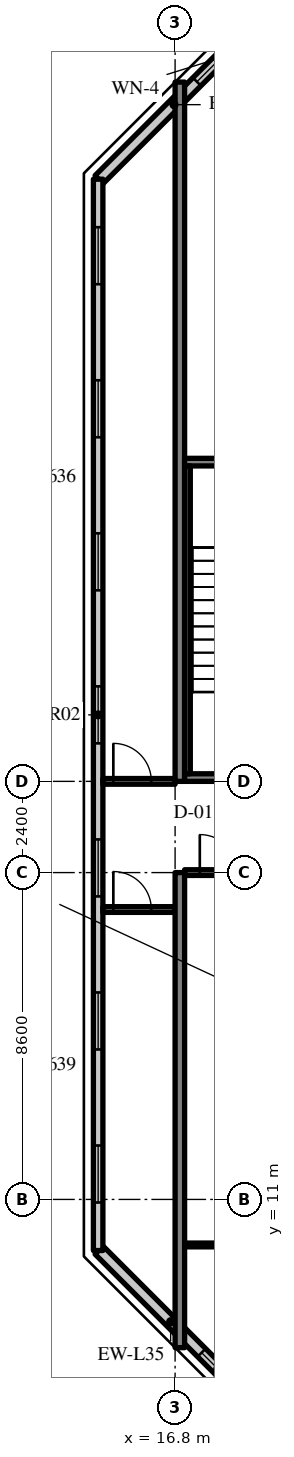
"""IFC4 building model, lengths in metres.
Left out: names, types, materials, properties, quantities, classifications, styles, units other than length and angle.
Written with IfcOpenShell. Run it as: python <this file> out.ifc"""

import sys

from ifc_helpers import new_model, si_unit, direction, frame, frame_2d, origin, place, context, subcontext, project, spatial, rectangle, extrude, source, transform, mapped, element, fill, save


model = new_model("IFC4")
c1 = context("Model", 3, precision=1e-05, world=origin(), true_north=direction((0.0, 1.0)))
c2 = subcontext(c1, "Body", "Model", "MODEL_VIEW")
j1 = project(units=[si_unit("LENGTHUNIT", "METRE"), si_unit("PLANEANGLEUNIT", "RADIAN")], contexts=[c1])
p1 = place(None, origin())
s1 = spatial("IfcSite", under=j1, at=p1, CompositionType="ELEMENT")
p2 = place(p1, origin())
s2 = spatial("IfcBuilding", under=s1, at=p2, CompositionType="ELEMENT")
p3 = place(p2, frame((0.0, 0.0, 277.7)))
s3 = spatial("IfcBuildingStorey", under=s2, at=p3, CompositionType="ELEMENT", Elevation=277.7)
m1 = source(origin(), c2, "Body", "SweptSolid", [
    extrude(rectangle(XDim=12.5, YDim=0.25, at=frame_2d((6.25, 0.0))), origin(), (0.0, 0.0, 1.0), 3.72),
])
p4 = place(p3, frame((16.925, 7.1, 0.0), z_axis=(0.0, 0.0, 1.0), x_axis=(0.0, 1.0, 0.0)))
e1 = element("IfcWall", 1, at=p4, inside=s3, PredefinedType="SHEAR", context=c2, shape_type="MappedRepresentation", body=[
    mapped(m1, transform((0.0, 0.0, 0.0), scale=1.0)),
])
m2 = source(origin(), c2, "Body", "SweptSolid", [
    extrude(rectangle(XDim=18.4, YDim=0.25, at=frame_2d((9.2, 0.0))), origin(), (0.0, 0.0, 1.0), 3.72),
])
p5 = place(p3, frame((16.925, 22.0, 0.0), z_axis=(0.0, 0.0, 1.0), x_axis=(0.0, 1.0, 0.0)))
e2 = element("IfcWall", 2, at=p5, inside=s3, PredefinedType="SHEAR", context=c2, shape_type="MappedRepresentation", body=[
    mapped(m2, transform((0.0, 0.0, 0.0), scale=1.0)),
])
m3 = source(origin(), c2, "Body", "SweptSolid", [
    extrude(rectangle(XDim=5.576, YDim=0.3, at=frame_2d((2.788, 0.0))), origin(), (0.0, 0.0, 1.0), 3.72),
])
p6 = place(p3, frame((18.743, 41.777, 0.0), z_axis=(0.0, 0.0, 1.0), x_axis=(-0.707106781187, -0.707106781187, 0.0)))
e3 = element("IfcWall", 3, at=p6, inside=s3, PredefinedType="SOLIDWALL", context=c2, shape_type="MappedRepresentation", body=[
    mapped(m3, transform((0.0, 0.0, 0.0), scale=1.0)),
])
m4 = source(origin(), c2, "Body", "SweptSolid", [
    extrude(rectangle(XDim=1.8, YDim=1.5, at=frame_2d((0.9, 0.75))), frame((0.0, 0.16, 0.0), z_axis=(0.0, -1.0, 0.0), x_axis=(1.0, 0.0, 0.0)), (0.0, 0.0, 1.0), 0.32),
])
p7 = place(p6, frame((0.135, 0.0, 0.9)))
e4 = element("IfcOpeningElement", 4, at=p7, cuts=e3, PredefinedType="OPENING", context=c2, shape_type="MappedRepresentation", body=[
    mapped(m4, transform((0.0, 0.0, 0.0), scale=1.0)),
])
m5 = source(origin(), c2, "Body", "SweptSolid", [
    extrude(rectangle(XDim=5.326, YDim=0.3, at=frame_2d((2.663, 0.0))), origin(), (0.0, 0.0, 1.0), 3.72),
])
p8 = place(p3, frame((14.8, 9.666, 0.0), z_axis=(0.0, 0.0, 1.0), x_axis=(0.707083859269, -0.707129702361, 0.0)))
e5 = element("IfcWall", 5, at=p8, inside=s3, PredefinedType="SOLIDWALL", context=c2, shape_type="MappedRepresentation", body=[
    mapped(m5, transform((0.0, 0.0, 0.0), scale=1.0)),
])
m6 = source(origin(), c2, "Body", "SweptSolid", [
    extrude(rectangle(XDim=1.2, YDim=1.5, at=frame_2d((0.6, 0.75))), frame((0.0, 0.16, 0.0), z_axis=(0.0, -1.0, 0.0), x_axis=(1.0, 0.0, 0.0)), (0.0, 0.0, 1.0), 0.32),
])
p9 = place(p8, frame((3.815, 0.0, 0.9)))
e6 = element("IfcOpeningElement", 6, at=p9, cuts=e5, PredefinedType="OPENING", context=c2, shape_type="MappedRepresentation", body=[
    mapped(m6, transform((0.0, 0.0, 0.0), scale=1.0)),
])
m7 = source(origin(), c2, "Body", "SweptSolid", [
    extrude(rectangle(XDim=28.189, YDim=0.25, at=frame_2d((14.095, 0.0))), origin(), (0.0, 0.0, 1.0), 3.72),
])
p10 = place(p3, frame((14.775, 37.845, 0.0), z_axis=(0.0, 0.0, 1.0), x_axis=(0.0, -1.0, 0.0)))
e7 = element("IfcWall", 7, at=p10, inside=s3, PredefinedType="SOLIDWALL", context=c2, shape_type="MappedRepresentation", body=[
    mapped(m7, transform((0.0, 0.0, 0.0), scale=1.0)),
])
m8 = source(origin(), c2, "Body", "SweptSolid", [
    extrude(rectangle(XDim=1.5, YDim=1.5, at=frame_2d((0.75, 0.75))), frame((0.0, 0.135, 0.0), z_axis=(0.0, -1.0, 0.0), x_axis=(1.0, 0.0, 0.0)), (0.0, 0.0, 1.0), 0.27),
])
p11 = place(p10, frame((1.263, 0.0, 0.9)))
e8 = element("IfcOpeningElement", 8, at=p11, cuts=e7, PredefinedType="OPENING", context=c2, shape_type="MappedRepresentation", body=[
    mapped(m8, transform((0.0, 0.0, 0.0), scale=1.0)),
])
p12 = place(p10, frame((5.291, 0.0, 0.9)))
e9 = element("IfcOpeningElement", 9, at=p12, cuts=e7, PredefinedType="OPENING", context=c2, shape_type="MappedRepresentation", body=[
    mapped(m8, transform((0.0, 0.0, 0.0), scale=1.0)),
])
p13 = place(p10, frame((9.318, 0.0, 0.9)))
e10 = element("IfcOpeningElement", 10, at=p13, cuts=e7, PredefinedType="OPENING", context=c2, shape_type="MappedRepresentation", body=[
    mapped(m8, transform((0.0, 0.0, 0.0), scale=1.0)),
])
p14 = place(p10, frame((13.345, 0.0, 0.9)))
e11 = element("IfcOpeningElement", 11, at=p14, cuts=e7, PredefinedType="OPENING", context=c2, shape_type="MappedRepresentation", body=[
    mapped(m8, transform((0.0, 0.0, 0.0), scale=1.0)),
])
p15 = place(p10, frame((17.372, 0.0, 0.9)))
e12 = element("IfcOpeningElement", 12, at=p15, cuts=e7, PredefinedType="OPENING", context=c2, shape_type="MappedRepresentation", body=[
    mapped(m8, transform((0.0, 0.0, 0.0), scale=1.0)),
])
p16 = place(p10, frame((21.399, 0.0, 0.9)))
e13 = element("IfcOpeningElement", 13, at=p16, cuts=e7, PredefinedType="OPENING", context=c2, shape_type="MappedRepresentation", body=[
    mapped(m8, transform((0.0, 0.0, 0.0), scale=1.0)),
])
p17 = place(p10, frame((25.426, 0.0, 0.9)))
e14 = element("IfcOpeningElement", 14, at=p17, cuts=e7, PredefinedType="OPENING", context=c2, shape_type="MappedRepresentation", body=[
    mapped(m8, transform((0.0, 0.0, 0.0), scale=1.0)),
])
m9 = source(origin(), c2, "Body", "SweptSolid", [
    extrude(rectangle(XDim=8.15, YDim=0.2, at=frame_2d((4.075, 0.0))), origin(), (0.0, 0.0, 1.0), 3.72),
])
p18 = place(p3, frame((17.05, 22.1, 0.0), z_axis=(0.0, 0.0, 1.0), x_axis=(1.0, 0.0, 0.0)))
e15 = element("IfcWall", 15, at=p18, inside=s3, PredefinedType="SOLIDWALL", context=c2, shape_type="MappedRepresentation", body=[
    mapped(m9, transform((0.0, 0.0, 0.0), scale=1.0)),
])
m10 = source(origin(), c2, "Body", "SweptSolid", [
    extrude(rectangle(XDim=1.2, YDim=2.1, at=frame_2d((0.6, 1.05))), frame((0.0, 0.11, 0.0), z_axis=(0.0, -1.0, 0.0), x_axis=(1.0, 0.0, 0.0)), (0.0, 0.0, 1.0), 0.22),
])
p19 = place(p18, frame((5.95, 0.0, 0.0)))
e16 = element("IfcOpeningElement", 16, at=p19, cuts=e15, PredefinedType="OPENING", context=c2, shape_type="MappedRepresentation", body=[
    mapped(m10, transform((0.0, 0.0, 0.0), scale=1.0)),
])
p20 = place(p3, frame((17.05, 30.4, 0.0), z_axis=(0.0, 0.0, 1.0), x_axis=(1.0, 0.0, 0.0)))
e17 = element("IfcWall", 17, at=p20, inside=s3, PredefinedType="SOLIDWALL", context=c2, shape_type="MappedRepresentation", body=[
    mapped(m9, transform((0.0, 0.0, 0.0), scale=1.0)),
])
m11 = source(origin(), c2, "Body", "SweptSolid", [
    extrude(rectangle(XDim=1.0, YDim=2.1, at=frame_2d((0.5, 1.05))), frame((0.0, 0.11, 0.0), z_axis=(0.0, -1.0, 0.0), x_axis=(1.0, 0.0, 0.0)), (0.0, 0.0, 1.0), 0.22),
])
p21 = place(p20, frame((6.05, 0.0, 0.0)))
e18 = element("IfcOpeningElement", 18, at=p21, cuts=e17, PredefinedType="OPENING", context=c2, shape_type="MappedRepresentation", body=[
    mapped(m11, transform((0.0, 0.0, 0.0), scale=1.0)),
])
m12 = source(origin(), c2, "Body", "SweptSolid", [
    extrude(rectangle(XDim=8.1, YDim=0.15, at=frame_2d((4.05, 0.0))), origin(), (0.0, 0.0, 1.0), 3.72),
])
p22 = place(p3, frame((17.125, 22.2, 0.0), z_axis=(0.0, 0.0, 1.0), x_axis=(0.0, 1.0, 0.0)))
e19 = element("IfcWall", 19, at=p22, inside=s3, PredefinedType="SOLIDWALL", context=c2, shape_type="MappedRepresentation", body=[
    mapped(m12, transform((0.0, 0.0, 0.0), scale=1.0)),
])
m13 = source(origin(), c2, "Body", "SweptSolid", [
    extrude(rectangle(XDim=8.025, YDim=0.1, at=frame_2d((4.012, 0.0))), origin(), (0.0, 0.0, 1.0), 3.72),
])
p23 = place(p3, frame((17.05, 9.802, 0.0), z_axis=(0.0, 0.0, 1.0), x_axis=(1.0, 0.0, 0.0)))
e20 = element("IfcWall", 20, at=p23, inside=s3, PredefinedType="PARTITIONING", context=c2, shape_type="MappedRepresentation", body=[
    mapped(m13, transform((0.0, 0.0, 0.0), scale=1.0)),
])
m14 = source(origin(), c2, "Body", "SweptSolid", [
    extrude(rectangle(XDim=1.8, YDim=2.1, at=frame_2d((0.9, 1.05))), frame((0.0, 0.06, 0.0), z_axis=(0.0, -1.0, 0.0), x_axis=(1.0, 0.0, 0.0)), (0.0, 0.0, 1.0), 0.12),
])
p24 = place(p23, frame((3.113, 0.0, 0.0)))
e21 = element("IfcOpeningElement", 21, at=p24, cuts=e20, PredefinedType="OPENING", context=c2, shape_type="MappedRepresentation", body=[
    mapped(m14, transform((0.0, 0.0, 0.0), scale=1.0)),
])
m15 = source(origin(), c2, "Body", "SweptSolid", [
    extrude(rectangle(XDim=8.025, YDim=0.15, at=frame_2d((4.012, 0.0))), origin(), (0.0, 0.0, 1.0), 3.02),
])
p25 = place(p3, frame((17.05, 19.6, 0.0), z_axis=(0.0, 0.0, 1.0), x_axis=(1.0, 0.0, 0.0)))
e22 = element("IfcWall", 22, at=p25, inside=s3, PredefinedType="PARTITIONING", context=c2, shape_type="MappedRepresentation", body=[
    mapped(m15, transform((0.0, 0.0, 0.0), scale=1.0)),
])
m16 = source(origin(), c2, "Body", "SweptSolid", [
    extrude(rectangle(XDim=1.0, YDim=2.1, at=frame_2d((0.5, 1.05))), frame((0.0, 0.085, 0.0), z_axis=(0.0, -1.0, 0.0), x_axis=(1.0, 0.0, 0.0)), (0.0, 0.0, 1.0), 0.17),
])
p26 = place(p25, frame((0.4, 0.0, 0.0)))
e23 = element("IfcOpeningElement", 23, at=p26, cuts=e22, PredefinedType="OPENING", context=c2, shape_type="MappedRepresentation", body=[
    mapped(m16, transform((0.0, 0.0, 0.0), scale=1.0)),
])
m17 = source(origin(), c2, "Body", "SweptSolid", [
    extrude(rectangle(XDim=1.9, YDim=0.15, at=frame_2d((0.95, 0.0))), origin(), (0.0, 0.0, 1.0), 3.02),
])
p27 = place(p3, frame((14.9, 22.0, 0.0), z_axis=(0.0, 0.0, 1.0), x_axis=(1.0, 0.0, 0.0)))
e24 = element("IfcWall", 24, at=p27, inside=s3, PredefinedType="PARTITIONING", context=c2, shape_type="MappedRepresentation", body=[
    mapped(m17, transform((0.0, 0.0, 0.0), scale=1.0)),
])
p28 = place(p27, frame((0.275, 0.0, 0.0)))
e25 = element("IfcOpeningElement", 25, at=p28, cuts=e24, PredefinedType="OPENING", context=c2, shape_type="MappedRepresentation", body=[
    mapped(m16, transform((0.0, 0.0, 0.0), scale=1.0)),
])
p29 = place(p3, frame((14.9, 18.628, 0.0), z_axis=(0.0, 0.0, 1.0), x_axis=(1.0, 0.0, 0.0)))
e26 = element("IfcWall", 26, at=p29, inside=s3, PredefinedType="PARTITIONING", context=c2, shape_type="MappedRepresentation", body=[
    mapped(m17, transform((0.0, 0.0, 0.0), scale=1.0)),
])
p30 = place(p29, frame((0.275, 0.0, 0.0)))
e27 = element("IfcOpeningElement", 27, at=p30, cuts=e26, PredefinedType="OPENING", context=c2, shape_type="MappedRepresentation", body=[
    mapped(m16, transform((0.0, 0.0, 0.0), scale=1.0)),
])
m18 = source(origin(), c2, "Body", "SweptSolid", [
    extrude(rectangle(XDim=1.8, YDim=1.5, at=frame_2d((0.9, 0.75))), frame((0.0, 0.03, 0.0), z_axis=(0.0, -1.0, 0.0), x_axis=(1.0, 0.0, 0.0)), (0.0, 0.0, 1.0), 0.06),
])
p31 = place(p7, origin())
e28 = element("IfcWindow", 28, at=p31, inside=s3, PartitioningType="SINGLE_PANEL", PredefinedType="WINDOW", context=c2, shape_type="MappedRepresentation", body=[
    mapped(m18, transform((0.0, 0.0, 0.0), scale=1.0)),
])
fill(e4, e28)
m19 = source(origin(), c2, "Body", "SweptSolid", [
    extrude(rectangle(XDim=1.2, YDim=1.5, at=frame_2d((0.6, 0.75))), frame((0.0, 0.03, 0.0), z_axis=(0.0, -1.0, 0.0), x_axis=(1.0, 0.0, 0.0)), (0.0, 0.0, 1.0), 0.06),
])
p32 = place(p9, origin())
e29 = element("IfcWindow", 29, at=p32, inside=s3, PartitioningType="SINGLE_PANEL", PredefinedType="WINDOW", context=c2, shape_type="MappedRepresentation", body=[
    mapped(m19, transform((0.0, 0.0, 0.0), scale=1.0)),
])
fill(e6, e29)
m20 = source(origin(), c2, "Body", "SweptSolid", [
    extrude(rectangle(XDim=1.5, YDim=1.5, at=frame_2d((0.75, 0.75))), frame((0.0, 0.03, 0.0), z_axis=(0.0, -1.0, 0.0), x_axis=(1.0, 0.0, 0.0)), (0.0, 0.0, 1.0), 0.06),
])
p33 = place(p11, origin())
e30 = element("IfcWindow", 30, at=p33, inside=s3, PartitioningType="SINGLE_PANEL", PredefinedType="WINDOW", context=c2, shape_type="MappedRepresentation", body=[
    mapped(m20, transform((0.0, 0.0, 0.0), scale=1.0)),
])
fill(e8, e30)
p34 = place(p12, origin())
e31 = element("IfcWindow", 31, at=p34, inside=s3, PartitioningType="SINGLE_PANEL", PredefinedType="WINDOW", context=c2, shape_type="MappedRepresentation", body=[
    mapped(m20, transform((0.0, 0.0, 0.0), scale=1.0)),
])
fill(e9, e31)
p35 = place(p13, origin())
e32 = element("IfcWindow", 32, at=p35, inside=s3, PartitioningType="SINGLE_PANEL", PredefinedType="WINDOW", context=c2, shape_type="MappedRepresentation", body=[
    mapped(m20, transform((0.0, 0.0, 0.0), scale=1.0)),
])
fill(e10, e32)
p36 = place(p14, origin())
e33 = element("IfcWindow", 33, at=p36, inside=s3, PartitioningType="SINGLE_PANEL", PredefinedType="WINDOW", context=c2, shape_type="MappedRepresentation", body=[
    mapped(m20, transform((0.0, 0.0, 0.0), scale=1.0)),
])
fill(e11, e33)
p37 = place(p15, origin())
e34 = element("IfcWindow", 34, at=p37, inside=s3, PartitioningType="SINGLE_PANEL", PredefinedType="WINDOW", context=c2, shape_type="MappedRepresentation", body=[
    mapped(m20, transform((0.0, 0.0, 0.0), scale=1.0)),
])
fill(e12, e34)
p38 = place(p16, origin())
e35 = element("IfcWindow", 35, at=p38, inside=s3, PartitioningType="SINGLE_PANEL", PredefinedType="WINDOW", context=c2, shape_type="MappedRepresentation", body=[
    mapped(m20, transform((0.0, 0.0, 0.0), scale=1.0)),
])
fill(e13, e35)
p39 = place(p17, origin())
e36 = element("IfcWindow", 36, at=p39, inside=s3, PartitioningType="SINGLE_PANEL", PredefinedType="WINDOW", context=c2, shape_type="MappedRepresentation", body=[
    mapped(m20, transform((0.0, 0.0, 0.0), scale=1.0)),
])
fill(e14, e36)
m21 = source(origin(), c2, "Body", "SweptSolid", [
    extrude(rectangle(XDim=1.0, YDim=2.1, at=frame_2d((0.5, 1.05))), frame((0.0, 0.025, 0.0), z_axis=(0.0, -1.0, 0.0), x_axis=(1.0, 0.0, 0.0)), (0.0, 0.0, 1.0), 0.05),
])
p40 = place(p26, origin())
e37 = element("IfcDoor", 37, at=p40, inside=s3, OperationType="SINGLE_SWING_LEFT", PredefinedType="DOOR", context=c2, shape_type="MappedRepresentation", body=[
    mapped(m21, transform((0.0, 0.0, 0.0), scale=1.0)),
])
fill(e23, e37)
p41 = place(p28, origin())
e38 = element("IfcDoor", 38, at=p41, inside=s3, OperationType="SINGLE_SWING_LEFT", PredefinedType="DOOR", context=c2, shape_type="MappedRepresentation", body=[
    mapped(m21, transform((0.0, 0.0, 0.0), scale=1.0)),
])
fill(e25, e38)
p42 = place(p30, origin())
e39 = element("IfcDoor", 39, at=p42, inside=s3, OperationType="SINGLE_SWING_LEFT", PredefinedType="DOOR", context=c2, shape_type="MappedRepresentation", body=[
    mapped(m21, transform((0.0, 0.0, 0.0), scale=1.0)),
])
fill(e27, e39)
save(model, sys.argv[1])
